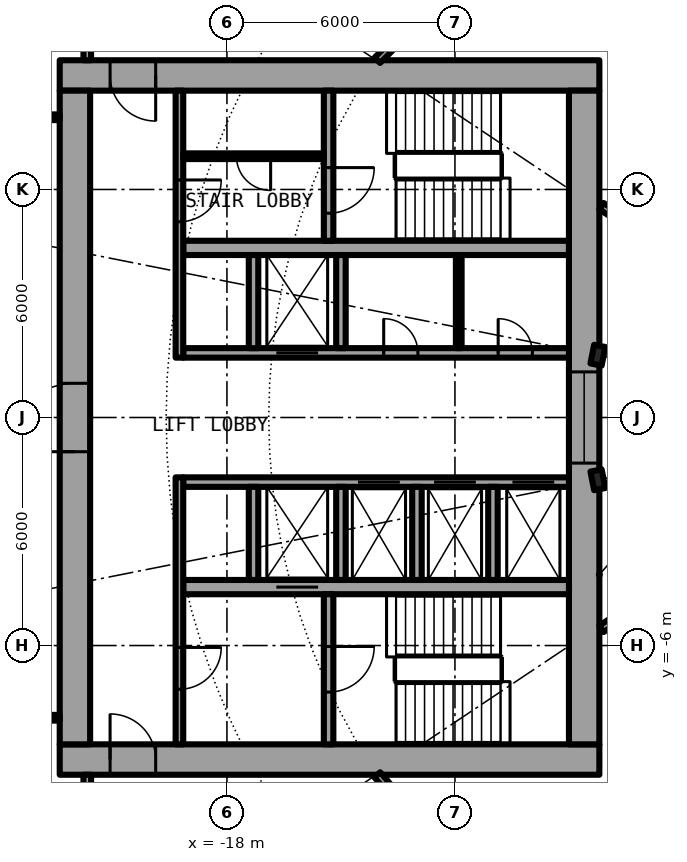
"""IFC4 building model, lengths in metres.
Left out: names, types, materials, properties, quantities, classifications, styles, units other than length and angle.
Written with IfcOpenShell. Run it as: python <this file> out.ifc"""

import sys

from ifc_helpers import new_model, si_unit, direction, frame, frame_2d, origin, origin_2d, place, context, subcontext, project, spatial, rectangle, i_section, extrude, element, fill, save


model = new_model("IFC4")
c1 = context("Model", 3, precision=1e-05, world=origin(), true_north=direction((0.0, 1.0)))
c2 = subcontext(c1, "Body", "Model", "MODEL_VIEW")
j1 = project(units=[si_unit("LENGTHUNIT", "METRE"), si_unit("PLANEANGLEUNIT", "RADIAN")], contexts=[c1])
p1 = place(None, origin())
s1 = spatial("IfcSite", under=j1, at=p1, CompositionType="ELEMENT")
p2 = place(p1, origin())
s2 = spatial("IfcBuilding", under=s1, at=p2, CompositionType="ELEMENT")
p3 = place(p2, frame((0.0, 0.0, 53.3)))
s3 = spatial("IfcBuildingStorey", under=s2, at=p3, CompositionType="ELEMENT", Elevation=53.3)
for number, where, z_axis, x_axis in (
    (1, (-8.239, 1.639, 0.0), (0.0, 0.0, 1.0), (-0.981, 0.195, 0.0)),
    (2, (-8.239, -1.639, 0.0), (0.0, 0.0, 1.0), (-0.981, -0.195, 0.0)),
):
    element("IfcColumn", number, at=place(p3, frame(where, z_axis=z_axis, x_axis=x_axis)), inside=s3, PredefinedType="COLUMN", context=c2, shape_type="SweptSolid", body=[
        extrude(i_section(OverallWidth=0.3, OverallDepth=0.5, WebThickness=0.014, FlangeThickness=0.028, FilletRadius=0.027, at=origin_2d()), origin(), (0.0, 0.0, 1.0), 4.2),
    ])
p4 = place(p3, frame((-22.4, -9.0, 0.0), z_axis=(0.0, 0.0, 1.0), x_axis=(1.0, 0.0, 0.0)))
e3 = element("IfcWall", 3, at=p4, inside=s3, PredefinedType="SHEAR", context=c2, shape_type="SweptSolid", body=[
    extrude(rectangle(XDim=14.2, YDim=0.8, at=frame_2d((7.1, 0.0))), origin(), (0.0, 0.0, 1.0), 4.2),
])
p5 = place(p4, frame((1.325, 0.0, 0.0)))
e4 = element("IfcOpeningElement", 4, at=p5, cuts=e3, PredefinedType="OPENING", context=c2, shape_type="SweptSolid", body=[
    extrude(rectangle(XDim=1.2, YDim=2.3, at=frame_2d((0.6, 1.15))), frame((0.0, 0.41, 0.0), z_axis=(0.0, -1.0, 0.0), x_axis=(1.0, 0.0, 0.0)), (0.0, 0.0, 1.0), 0.82),
])
p6 = place(p3, frame((-8.2, 9.0, 0.0), z_axis=(0.0, 0.0, 1.0), x_axis=(-1.0, 0.0, 0.0)))
e5 = element("IfcWall", 5, at=p6, inside=s3, PredefinedType="SHEAR", context=c2, shape_type="SweptSolid", body=[
    extrude(rectangle(XDim=14.2, YDim=0.8, at=frame_2d((7.1, 0.0))), origin(), (0.0, 0.0, 1.0), 4.2),
])
p7 = place(p6, frame((11.675, 0.0, 0.0)))
e6 = element("IfcOpeningElement", 6, at=p7, cuts=e5, PredefinedType="OPENING", context=c2, shape_type="SweptSolid", body=[
    extrude(rectangle(XDim=1.2, YDim=2.3, at=frame_2d((0.6, 1.15))), frame((0.0, 0.41, 0.0), z_axis=(0.0, -1.0, 0.0), x_axis=(1.0, 0.0, 0.0)), (0.0, 0.0, 1.0), 0.82),
])
p8 = place(p3, frame((-22.0, -8.6, 0.0), z_axis=(0.0, 0.0, 1.0), x_axis=(0.0, 1.0, 0.0)))
e7 = element("IfcWall", 7, at=p8, inside=s3, PredefinedType="SHEAR", context=c2, shape_type="SweptSolid", body=[
    extrude(rectangle(XDim=17.2, YDim=0.8, at=frame_2d((8.6, 0.0))), origin(), (0.0, 0.0, 1.0), 4.2),
])
p9 = place(p8, frame((7.7, 0.0, 0.0)))
e8 = element("IfcOpeningElement", 8, at=p9, cuts=e7, PredefinedType="OPENING", context=c2, shape_type="SweptSolid", body=[
    extrude(rectangle(XDim=1.8, YDim=2.3, at=frame_2d((0.9, 1.15))), frame((0.0, 0.41, 0.0), z_axis=(0.0, -1.0, 0.0), x_axis=(1.0, 0.0, 0.0)), (0.0, 0.0, 1.0), 0.82),
])
p10 = place(p3, frame((-8.6, 8.6, 0.0), z_axis=(0.0, 0.0, 1.0), x_axis=(0.0, -1.0, 0.0)))
e9 = element("IfcWall", 9, at=p10, inside=s3, PredefinedType="SHEAR", context=c2, shape_type="SweptSolid", body=[
    extrude(rectangle(XDim=17.2, YDim=0.8, at=frame_2d((8.6, 0.0))), origin(), (0.0, 0.0, 1.0), 4.2),
])
p11 = place(p10, frame((7.4, 0.0, 0.1)))
e10 = element("IfcOpeningElement", 10, at=p11, cuts=e9, PredefinedType="OPENING", context=c2, shape_type="SweptSolid", body=[
    extrude(rectangle(XDim=2.4, YDim=2.2, at=frame_2d((1.2, 1.1))), frame((0.0, 0.41, 0.0), z_axis=(0.0, -1.0, 0.0), x_axis=(1.0, 0.0, 0.0)), (0.0, 0.0, 1.0), 0.82),
])
p12 = place(p3, frame((-9.0, -1.7, 0.0), z_axis=(0.0, 0.0, 1.0), x_axis=(-1.0, 0.0, 0.0)))
e11 = element("IfcWall", 11, at=p12, inside=s3, PredefinedType="SHEAR", context=c2, shape_type="SweptSolid", body=[
    extrude(rectangle(XDim=10.15, YDim=0.25, at=frame_2d((5.075, 0.0))), origin(), (0.0, 0.0, 1.0), 4.2),
])
p13 = place(p12, frame((0.387, 0.0, 0.0)))
e12 = element("IfcOpeningElement", 12, at=p13, cuts=e11, PredefinedType="OPENING", context=c2, shape_type="SweptSolid", body=[
    extrude(rectangle(XDim=1.1, YDim=2.3, at=frame_2d((0.55, 1.15))), frame((0.0, 0.135, 0.0), z_axis=(0.0, -1.0, 0.0), x_axis=(1.0, 0.0, 0.0)), (0.0, 0.0, 1.0), 0.27),
])
p14 = place(p12, frame((2.45, 0.0, 0.0)))
e13 = element("IfcOpeningElement", 13, at=p14, cuts=e11, PredefinedType="OPENING", context=c2, shape_type="SweptSolid", body=[
    extrude(rectangle(XDim=1.1, YDim=2.3, at=frame_2d((0.55, 1.15))), frame((0.0, 0.135, 0.0), z_axis=(0.0, -1.0, 0.0), x_axis=(1.0, 0.0, 0.0)), (0.0, 0.0, 1.0), 0.27),
])
p15 = place(p12, frame((4.45, 0.0, 0.0)))
e14 = element("IfcOpeningElement", 14, at=p15, cuts=e11, PredefinedType="OPENING", context=c2, shape_type="SweptSolid", body=[
    extrude(rectangle(XDim=1.1, YDim=2.3, at=frame_2d((0.55, 1.15))), frame((0.0, 0.135, 0.0), z_axis=(0.0, -1.0, 0.0), x_axis=(1.0, 0.0, 0.0)), (0.0, 0.0, 1.0), 0.27),
])
p16 = place(p3, frame((-9.0, -4.462, 0.0), z_axis=(0.0, 0.0, 1.0), x_axis=(-1.0, 0.0, 0.0)))
e15 = element("IfcWall", 15, at=p16, inside=s3, PredefinedType="SHEAR", context=c2, shape_type="SweptSolid", body=[
    extrude(rectangle(XDim=10.15, YDim=0.375, at=frame_2d((5.075, 0.0))), origin(), (0.0, 0.0, 1.0), 4.2),
])
p17 = place(p16, frame((6.6, 0.0, 0.0)))
e16 = element("IfcOpeningElement", 16, at=p17, cuts=e15, PredefinedType="OPENING", context=c2, shape_type="SweptSolid", body=[
    extrude(rectangle(XDim=1.1, YDim=2.3, at=frame_2d((0.55, 1.15))), frame((0.0, 0.198, 0.0), z_axis=(0.0, -1.0, 0.0), x_axis=(1.0, 0.0, 0.0)), (0.0, 0.0, 1.0), 0.395),
])
p18 = place(p3, frame((-15.325, -4.65, 0.0), z_axis=(0.0, 0.0, 1.0), x_axis=(0.0, -1.0, 0.0)))
e17 = element("IfcWall", 17, at=p18, inside=s3, PredefinedType="SHEAR", context=c2, shape_type="SweptSolid", body=[
    extrude(rectangle(XDim=3.95, YDim=0.25, at=frame_2d((1.975, 0.0))), origin(), (0.0, 0.0, 1.0), 4.2),
])
p19 = place(p18, frame((1.375, 0.0, 0.0)))
e18 = element("IfcOpeningElement", 18, at=p19, cuts=e17, PredefinedType="OPENING", context=c2, shape_type="SweptSolid", body=[
    extrude(rectangle(XDim=1.2, YDim=2.3, at=frame_2d((0.6, 1.15))), frame((0.0, 0.135, 0.0), z_axis=(0.0, -1.0, 0.0), x_axis=(1.0, 0.0, 0.0)), (0.0, 0.0, 1.0), 0.27),
])
for number, where, z_axis, x_axis in (
    (19, (-15.0, -1.825, 0.0), (0.0, 0.0, 1.0), (0.0, -1.0, 0.0)),
    (20, (-17.3, -1.825, 0.0), (0.0, 0.0, 1.0), (0.0, -1.0, 0.0)),
):
    element("IfcWall", number, at=place(p3, frame(where, z_axis=z_axis, x_axis=x_axis)), inside=s3, PredefinedType="SOLIDWALL", context=c2, shape_type="SweptSolid", body=[
        extrude(rectangle(XDim=2.45, YDim=0.25, at=frame_2d((1.225, 0.0))), origin(), (0.0, 0.0, 1.0), 3.8),
    ])
p20 = place(p3, frame((-19.25, -1.575, 0.0), z_axis=(0.0, 0.0, 1.0), x_axis=(0.0, -1.0, 0.0)))
e21 = element("IfcWall", 21, at=p20, inside=s3, PredefinedType="SOLIDWALL", context=c2, shape_type="SweptSolid", body=[
    extrude(rectangle(XDim=7.025, YDim=0.2, at=frame_2d((3.513, 0.0))), origin(), (0.0, 0.0, 1.0), 3.8),
])
p21 = place(p20, frame((4.475, 0.0, 0.0)))
e22 = element("IfcOpeningElement", 22, at=p21, cuts=e21, PredefinedType="OPENING", context=c2, shape_type="SweptSolid", body=[
    extrude(rectangle(XDim=1.1, YDim=2.3, at=frame_2d((0.55, 1.15))), frame((0.0, 0.11, 0.0), z_axis=(0.0, -1.0, 0.0), x_axis=(1.0, 0.0, 0.0)), (0.0, 0.0, 1.0), 0.22),
])
p22 = place(p3, frame((-19.15, 1.7, 0.0), z_axis=(0.0, 0.0, 1.0), x_axis=(1.0, 0.0, 0.0)))
e23 = element("IfcWall", 23, at=p22, inside=s3, PredefinedType="SHEAR", context=c2, shape_type="SweptSolid", body=[
    extrude(rectangle(XDim=10.15, YDim=0.25, at=frame_2d((5.075, 0.0))), origin(), (0.0, 0.0, 1.0), 4.2),
])
p23 = place(p22, frame((2.45, 0.0, 0.0)))
e24 = element("IfcOpeningElement", 24, at=p23, cuts=e23, PredefinedType="OPENING", context=c2, shape_type="SweptSolid", body=[
    extrude(rectangle(XDim=1.1, YDim=2.3, at=frame_2d((0.55, 1.15))), frame((0.0, 0.135, 0.0), z_axis=(0.0, -1.0, 0.0), x_axis=(1.0, 0.0, 0.0)), (0.0, 0.0, 1.0), 0.27),
])
p24 = place(p22, frame((8.288, 0.0, 0.0)))
e25 = element("IfcOpeningElement", 25, at=p24, cuts=e23, PredefinedType="OPENING", context=c2, shape_type="SweptSolid", body=[
    extrude(rectangle(XDim=0.9, YDim=2.3, at=frame_2d((0.45, 1.15))), frame((0.0, 0.135, 0.0), z_axis=(0.0, -1.0, 0.0), x_axis=(1.0, 0.0, 0.0)), (0.0, 0.0, 1.0), 0.27),
])
p25 = place(p22, frame((5.275, 0.0, 0.0)))
e26 = element("IfcOpeningElement", 26, at=p25, cuts=e23, PredefinedType="OPENING", context=c2, shape_type="SweptSolid", body=[
    extrude(rectangle(XDim=0.9, YDim=2.3, at=frame_2d((0.45, 1.15))), frame((0.0, 0.135, 0.0), z_axis=(0.0, -1.0, 0.0), x_axis=(1.0, 0.0, 0.0)), (0.0, 0.0, 1.0), 0.27),
])
p26 = place(p3, frame((-9.0, 4.462, 0.0), z_axis=(0.0, 0.0, 1.0), x_axis=(-1.0, 0.0, 0.0)))
e27 = element("IfcWall", 27, at=p26, inside=s3, PredefinedType="SHEAR", context=c2, shape_type="SweptSolid", body=[
    extrude(rectangle(XDim=10.15, YDim=0.375, at=frame_2d((5.075, 0.0))), origin(), (0.0, 0.0, 1.0), 4.2),
])
p27 = place(p3, frame((-15.325, 8.6, 0.0), z_axis=(0.0, 0.0, 1.0), x_axis=(0.0, -1.0, 0.0)))
e28 = element("IfcWall", 28, at=p27, inside=s3, PredefinedType="SHEAR", context=c2, shape_type="SweptSolid", body=[
    extrude(rectangle(XDim=3.95, YDim=0.25, at=frame_2d((1.975, 0.0))), origin(), (0.0, 0.0, 1.0), 4.2),
])
p28 = place(p27, frame((2.025, 0.0, 0.0)))
e29 = element("IfcOpeningElement", 29, at=p28, cuts=e28, PredefinedType="OPENING", context=c2, shape_type="SweptSolid", body=[
    extrude(rectangle(XDim=1.2, YDim=2.3, at=frame_2d((0.6, 1.15))), frame((0.0, 0.135, 0.0), z_axis=(0.0, -1.0, 0.0), x_axis=(1.0, 0.0, 0.0)), (0.0, 0.0, 1.0), 0.27),
])
for number, where, z_axis, x_axis in (
    (30, (-15.0, 1.825, 0.0), (0.0, 0.0, 1.0), (0.0, 1.0, 0.0)),
    (31, (-17.3, 1.825, 0.0), (0.0, 0.0, 1.0), (0.0, 1.0, 0.0)),
):
    element("IfcWall", number, at=place(p3, frame(where, z_axis=z_axis, x_axis=x_axis)), inside=s3, PredefinedType="SOLIDWALL", context=c2, shape_type="SweptSolid", body=[
        extrude(rectangle(XDim=2.45, YDim=0.25, at=frame_2d((1.225, 0.0))), origin(), (0.0, 0.0, 1.0), 3.8),
    ])
p29 = place(p3, frame((-19.25, 8.6, 0.0), z_axis=(0.0, 0.0, 1.0), x_axis=(0.0, -1.0, 0.0)))
e32 = element("IfcWall", 32, at=p29, inside=s3, PredefinedType="SOLIDWALL", context=c2, shape_type="SweptSolid", body=[
    extrude(rectangle(XDim=7.025, YDim=0.2, at=frame_2d((3.513, 0.0))), origin(), (0.0, 0.0, 1.0), 3.8),
])
p30 = place(p29, frame((2.35, 0.0, 0.0)))
e33 = element("IfcOpeningElement", 33, at=p30, cuts=e32, PredefinedType="OPENING", context=c2, shape_type="SweptSolid", body=[
    extrude(rectangle(XDim=1.1, YDim=2.3, at=frame_2d((0.55, 1.15))), frame((0.0, 0.11, 0.0), z_axis=(0.0, -1.0, 0.0), x_axis=(1.0, 0.0, 0.0)), (0.0, 0.0, 1.0), 0.22),
])
for number, where, z_axis, x_axis in (
    (34, (-11.0, -1.825, 0.0), (0.0, 0.0, 1.0), (0.0, -1.0, 0.0)),
    (35, (-13.0, -1.825, 0.0), (0.0, 0.0, 1.0), (0.0, -1.0, 0.0)),
):
    element("IfcWall", number, at=place(p3, frame(where, z_axis=z_axis, x_axis=x_axis)), inside=s3, PredefinedType="SOLIDWALL", context=c2, shape_type="SweptSolid", body=[
        extrude(rectangle(XDim=2.45, YDim=0.25, at=frame_2d((1.225, 0.0))), origin(), (0.0, 0.0, 1.0), 3.8),
    ])
p31 = place(p3, frame((-11.9, 1.825, 0.0), z_axis=(0.0, 0.0, 1.0), x_axis=(0.0, 1.0, 0.0)))
e36 = element("IfcWall", 36, at=p31, inside=s3, PredefinedType="PARTITIONING", context=c2, shape_type="SweptSolid", body=[
    extrude(rectangle(XDim=2.45, YDim=0.15, at=frame_2d((1.225, 0.0))), origin(), (0.0, 0.0, 1.0), 3.8),
])
p32 = place(p3, frame((-15.45, 6.875, 0.0), z_axis=(0.0, 0.0, 1.0), x_axis=(-1.0, 0.0, 0.0)))
e37 = element("IfcWall", 37, at=p32, inside=s3, PredefinedType="PARTITIONING", context=c2, shape_type="SweptSolid", body=[
    extrude(rectangle(XDim=3.7, YDim=0.15, at=frame_2d((1.85, 0.0))), origin(), (0.0, 0.0, 1.0), 3.8),
])
p33 = place(p32, frame((1.4, 0.0, 0.0)))
e38 = element("IfcOpeningElement", 38, at=p33, cuts=e37, PredefinedType="OPENING", context=c2, shape_type="SweptSolid", body=[
    extrude(rectangle(XDim=0.9, YDim=2.3, at=frame_2d((0.45, 1.15))), frame((0.0, 0.085, 0.0), z_axis=(0.0, -1.0, 0.0), x_axis=(1.0, 0.0, 0.0)), (0.0, 0.0, 1.0), 0.17),
])
for number, where, z_axis, x_axis in (
    (39, (-22.4, 7.9, 0.0), (0.0, 0.0, 1.0), (-1.0, 0.0, 0.0)),
    (40, (-22.4, -7.9, 0.0), (0.0, 0.0, 1.0), (-1.0, 0.0, 0.0)),
):
    element("IfcWall", number, at=place(p3, frame(where, z_axis=z_axis, x_axis=x_axis)), inside=s3, PredefinedType="PARTITIONING", context=c2, shape_type="SweptSolid", body=[
        extrude(rectangle(XDim=2.54, YDim=0.15, at=frame_2d((1.27, 0.0))), origin(), (0.0, 0.0, 1.0), 3.8),
    ])
p34 = place(p3, frame((-14.043, -9.4, 0.0), z_axis=(0.0, 0.0, 1.0), x_axis=(0.653274518104, -0.757121129012, 0.0)))
e41 = element("IfcWall", 41, at=p34, inside=s3, PredefinedType="PARTITIONING", context=c2, shape_type="SweptSolid", body=[
    extrude(rectangle(XDim=4.124, YDim=0.2, at=frame_2d((2.062, 0.0))), origin(), (0.0, 0.0, 1.0), 3.8),
])
p35 = place(p3, frame((-6.513, -4.472, 0.0), z_axis=(0.0, 0.0, 1.0), x_axis=(-0.831417956244, -0.555647533996, 0.0)))
e42 = element("IfcWall", 42, at=p35, inside=s3, PredefinedType="PARTITIONING", context=c2, shape_type="SweptSolid", body=[
    extrude(rectangle(XDim=1.962, YDim=0.2, at=frame_2d((0.981, 0.0))), origin(), (0.0, 0.0, 1.0), 3.8),
])
p36 = place(p3, frame((-9.389, 14.052, 0.0), z_axis=(0.0, 0.0, 1.0), x_axis=(0.555540720778, -0.831489330994, 0.0)))
e43 = element("IfcWall", 43, at=p36, inside=s3, PredefinedType="PARTITIONING", context=c2, shape_type="SweptSolid", body=[
    extrude(rectangle(XDim=9.18, YDim=0.15, at=frame_2d((4.59, 0.0))), origin(), (0.0, 0.0, 1.0), 3.8),
])
p37 = place(p3, frame((-7.966, -14.905, 0.0), z_axis=(0.0, 0.0, 1.0), x_axis=(0.471460365694, 0.881887251059, 0.0)))
e44 = element("IfcWall", 44, at=p37, inside=s3, PredefinedType="PARTITIONING", context=c2, shape_type="SweptSolid", body=[
    extrude(rectangle(XDim=9.18, YDim=0.15, at=frame_2d((4.59, 0.0))), origin(), (0.0, 0.0, 1.0), 3.8),
])
p38 = place(p3, frame((-6.513, 4.472, 0.0), z_axis=(0.0, 0.0, 1.0), x_axis=(-0.831417956244, 0.555647533996, 0.0)))
e45 = element("IfcWall", 45, at=p38, inside=s3, PredefinedType="PARTITIONING", context=c2, shape_type="SweptSolid", body=[
    extrude(rectangle(XDim=1.962, YDim=0.2, at=frame_2d((0.981, 0.0))), origin(), (0.0, 0.0, 1.0), 3.8),
])
p39 = place(p3, frame((-14.041, 9.4, 0.0), z_axis=(0.0, 0.0, 1.0), x_axis=(0.707106781187, 0.707106781187, 0.0)))
e46 = element("IfcWall", 46, at=p39, inside=s3, PredefinedType="PARTITIONING", context=c2, shape_type="SweptSolid", body=[
    extrude(rectangle(XDim=6.579, YDim=0.2, at=frame_2d((3.29, 0.0))), origin(), (0.0, 0.0, 1.0), 3.8),
])
p40 = place(p39, frame((2.789, 0.0, 0.0)))
e47 = element("IfcOpeningElement", 47, at=p40, cuts=e46, PredefinedType="OPENING", context=c2, shape_type="SweptSolid", body=[
    extrude(rectangle(XDim=1.0, YDim=2.3, at=frame_2d((0.5, 1.15))), frame((0.0, 0.11, 0.0), z_axis=(0.0, -1.0, 0.0), x_axis=(1.0, 0.0, 0.0)), (0.0, 0.0, 1.0), 0.22),
])
for number, where, z_axis, x_axis in (
    (48, (-21.675, -11.0, 0.0), (0.0, 0.0, 1.0), (0.0, 1.0, 0.0)),
    (49, (-21.675, 9.4, 0.0), (0.0, 0.0, 1.0), (0.0, 1.0, 0.0)),
):
    element("IfcWall", number, at=place(p3, frame(where, z_axis=z_axis, x_axis=x_axis)), inside=s3, PredefinedType="PARTITIONING", context=c2, shape_type="SweptSolid", body=[
        extrude(rectangle(XDim=1.6, YDim=0.2, at=frame_2d((0.8, 0.0))), origin(), (0.0, 0.0, 1.0), 3.8),
    ])
p41 = place(p13, origin())
e50 = element("IfcDoor", 50, at=p41, inside=s3, OperationType="DOUBLE_DOOR_SLIDING", PredefinedType="DOOR", context=c2, shape_type="SweptSolid", body=[
    extrude(rectangle(XDim=1.1, YDim=2.3, at=frame_2d((0.55, 1.15))), frame((0.0, 0.025, 0.0), z_axis=(0.0, -1.0, 0.0), x_axis=(1.0, 0.0, 0.0)), (0.0, 0.0, 1.0), 0.05),
])
fill(e12, e50)
p42 = place(p14, origin())
e51 = element("IfcDoor", 51, at=p42, inside=s3, OperationType="DOUBLE_DOOR_SLIDING", PredefinedType="DOOR", context=c2, shape_type="SweptSolid", body=[
    extrude(rectangle(XDim=1.1, YDim=2.3, at=frame_2d((0.55, 1.15))), frame((0.0, 0.025, 0.0), z_axis=(0.0, -1.0, 0.0), x_axis=(1.0, 0.0, 0.0)), (0.0, 0.0, 1.0), 0.05),
])
fill(e13, e51)
p43 = place(p15, origin())
e52 = element("IfcDoor", 52, at=p43, inside=s3, OperationType="DOUBLE_DOOR_SLIDING", PredefinedType="DOOR", context=c2, shape_type="SweptSolid", body=[
    extrude(rectangle(XDim=1.1, YDim=2.3, at=frame_2d((0.55, 1.15))), frame((0.0, 0.025, 0.0), z_axis=(0.0, -1.0, 0.0), x_axis=(1.0, 0.0, 0.0)), (0.0, 0.0, 1.0), 0.05),
])
fill(e14, e52)
p44 = place(p17, origin())
e53 = element("IfcDoor", 53, at=p44, inside=s3, OperationType="DOUBLE_DOOR_SLIDING", PredefinedType="DOOR", context=c2, shape_type="SweptSolid", body=[
    extrude(rectangle(XDim=1.1, YDim=2.3, at=frame_2d((0.55, 1.15))), frame((0.0, 0.025, 0.0), z_axis=(0.0, -1.0, 0.0), x_axis=(1.0, 0.0, 0.0)), (0.0, 0.0, 1.0), 0.05),
])
fill(e16, e53)
p45 = place(p23, origin())
e54 = element("IfcDoor", 54, at=p45, inside=s3, OperationType="DOUBLE_DOOR_SLIDING", PredefinedType="DOOR", context=c2, shape_type="SweptSolid", body=[
    extrude(rectangle(XDim=1.1, YDim=2.3, at=frame_2d((0.55, 1.15))), frame((0.0, 0.025, 0.0), z_axis=(0.0, -1.0, 0.0), x_axis=(1.0, 0.0, 0.0)), (0.0, 0.0, 1.0), 0.05),
])
fill(e24, e54)
p46 = place(p24, origin())
e55 = element("IfcDoor", 55, at=p46, inside=s3, OperationType="SINGLE_SWING_LEFT", PredefinedType="DOOR", context=c2, shape_type="SweptSolid", body=[
    extrude(rectangle(XDim=0.9, YDim=2.3, at=frame_2d((0.45, 1.15))), frame((0.0, 0.025, 0.0), z_axis=(0.0, -1.0, 0.0), x_axis=(1.0, 0.0, 0.0)), (0.0, 0.0, 1.0), 0.05),
])
fill(e25, e55)
p47 = place(p25, origin())
e56 = element("IfcDoor", 56, at=p47, inside=s3, OperationType="SINGLE_SWING_LEFT", PredefinedType="DOOR", context=c2, shape_type="SweptSolid", body=[
    extrude(rectangle(XDim=0.9, YDim=2.3, at=frame_2d((0.45, 1.15))), frame((0.0, 0.025, 0.0), z_axis=(0.0, -1.0, 0.0), x_axis=(1.0, 0.0, 0.0)), (0.0, 0.0, 1.0), 0.05),
])
fill(e26, e56)
p48 = place(p33, origin())
e57 = element("IfcDoor", 57, at=p48, inside=s3, OperationType="SINGLE_SWING_LEFT", PredefinedType="DOOR", context=c2, shape_type="SweptSolid", body=[
    extrude(rectangle(XDim=0.9, YDim=2.3, at=frame_2d((0.45, 1.15))), frame((0.0, 0.025, 0.0), z_axis=(0.0, -1.0, 0.0), x_axis=(1.0, 0.0, 0.0)), (0.0, 0.0, 1.0), 0.05),
])
fill(e38, e57)
p49 = place(p19, origin())
e58 = element("IfcDoor", 58, at=p49, inside=s3, OperationType="SINGLE_SWING_LEFT", PredefinedType="DOOR", context=c2, shape_type="SweptSolid", body=[
    extrude(rectangle(XDim=1.2, YDim=2.3, at=frame_2d((0.6, 1.15))), frame((0.0, 0.025, 0.0), z_axis=(0.0, -1.0, 0.0), x_axis=(1.0, 0.0, 0.0)), (0.0, 0.0, 1.0), 0.05),
])
fill(e18, e58)
p50 = place(p28, origin())
e59 = element("IfcDoor", 59, at=p50, inside=s3, OperationType="SINGLE_SWING_LEFT", PredefinedType="DOOR", context=c2, shape_type="SweptSolid", body=[
    extrude(rectangle(XDim=1.2, YDim=2.3, at=frame_2d((0.6, 1.15))), frame((0.0, 0.025, 0.0), z_axis=(0.0, -1.0, 0.0), x_axis=(1.0, 0.0, 0.0)), (0.0, 0.0, 1.0), 0.05),
])
fill(e29, e59)
p51 = place(p21, origin())
e60 = element("IfcDoor", 60, at=p51, inside=s3, OperationType="SINGLE_SWING_LEFT", PredefinedType="DOOR", context=c2, shape_type="SweptSolid", body=[
    extrude(rectangle(XDim=1.1, YDim=2.3, at=frame_2d((0.55, 1.15))), frame((0.0, 0.025, 0.0), z_axis=(0.0, -1.0, 0.0), x_axis=(1.0, 0.0, 0.0)), (0.0, 0.0, 1.0), 0.05),
])
fill(e22, e60)
p52 = place(p30, origin())
e61 = element("IfcDoor", 61, at=p52, inside=s3, OperationType="SINGLE_SWING_RIGHT", PredefinedType="DOOR", context=c2, shape_type="SweptSolid", body=[
    extrude(rectangle(XDim=1.1, YDim=2.3, at=frame_2d((0.55, 1.15))), frame((0.0, 0.025, 0.0), z_axis=(0.0, -1.0, 0.0), x_axis=(1.0, 0.0, 0.0)), (0.0, 0.0, 1.0), 0.05),
])
fill(e33, e61)
p53 = place(p5, origin())
e62 = element("IfcDoor", 62, at=p53, inside=s3, OperationType="SINGLE_SWING_RIGHT", PredefinedType="DOOR", context=c2, shape_type="SweptSolid", body=[
    extrude(rectangle(XDim=1.2, YDim=2.3, at=frame_2d((0.6, 1.15))), frame((0.0, 0.025, 0.0), z_axis=(0.0, -1.0, 0.0), x_axis=(1.0, 0.0, 0.0)), (0.0, 0.0, 1.0), 0.05),
])
fill(e4, e62)
p54 = place(p7, origin())
e63 = element("IfcDoor", 63, at=p54, inside=s3, OperationType="SINGLE_SWING_LEFT", PredefinedType="DOOR", context=c2, shape_type="SweptSolid", body=[
    extrude(rectangle(XDim=1.2, YDim=2.3, at=frame_2d((0.6, 1.15))), frame((0.0, 0.025, 0.0), z_axis=(0.0, -1.0, 0.0), x_axis=(1.0, 0.0, 0.0)), (0.0, 0.0, 1.0), 0.05),
])
fill(e6, e63)
p55 = place(p9, origin())
e64 = element("IfcDoor", 64, at=p55, inside=s3, OperationType="SINGLE_SWING_LEFT", PredefinedType="DOOR", context=c2, shape_type="SweptSolid", body=[
    extrude(rectangle(XDim=1.8, YDim=2.3, at=frame_2d((0.9, 1.15))), frame((0.0, 0.025, 0.0), z_axis=(0.0, -1.0, 0.0), x_axis=(1.0, 0.0, 0.0)), (0.0, 0.0, 1.0), 0.05),
])
fill(e8, e64)
p56 = place(p11, origin())
e65 = element("IfcWindow", 65, at=p56, inside=s3, PartitioningType="SINGLE_PANEL", PredefinedType="WINDOW", context=c2, shape_type="SweptSolid", body=[
    extrude(rectangle(XDim=2.4, YDim=2.2, at=frame_2d((1.2, 1.1))), frame((0.0, 0.03, 0.0), z_axis=(0.0, -1.0, 0.0), x_axis=(1.0, 0.0, 0.0)), (0.0, 0.0, 1.0), 0.06),
])
fill(e10, e65)
save(model, sys.argv[1])
